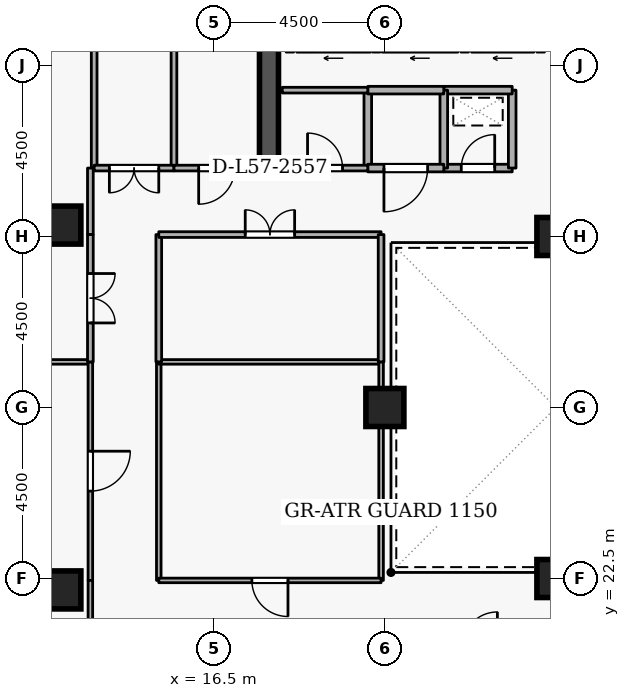
"""IFC4 building model, lengths in metres.
Left out: names, types, materials, properties, quantities, classifications, styles, units other than length and angle.
Written with IfcOpenShell. Run it as: python <this file> out.ifc"""

import sys

from ifc_helpers import new_model, si_unit, direction, frame, frame_2d, origin, origin_2d, place, context, subcontext, project, spatial, rectangle, extrude, element, fill, save


model = new_model("IFC4")
c1 = context("Model", 3, precision=1e-05, world=origin(), true_north=direction((0.0, 1.0)))
c2 = subcontext(c1, "Body", "Model", "MODEL_VIEW")
j1 = project(units=[si_unit("LENGTHUNIT", "METRE"), si_unit("PLANEANGLEUNIT", "RADIAN")], contexts=[c1])
p1 = place(None, origin())
s1 = spatial("IfcSite", under=j1, at=p1, CompositionType="ELEMENT")
p2 = place(p1, origin())
s2 = spatial("IfcBuilding", under=s1, at=p2, CompositionType="ELEMENT")
p3 = place(p2, frame((0.0, 0.0, 214.5)))
s3 = spatial("IfcBuildingStorey", under=s2, at=p3, CompositionType="ELEMENT", Elevation=214.5)
p4 = place(p3, frame((17.95, 33.1, 0.0), z_axis=(0.0, 0.0, 1.0), x_axis=(0.0, 1.0, 0.0)))
e1 = element("IfcWall", 1, at=p4, inside=s3, PredefinedType="SHEAR", context=c2, shape_type="SweptSolid", body=[
    extrude(rectangle(XDim=5.8, YDim=0.5, at=frame_2d((2.9, 0.0))), origin(), (0.0, 0.0, 1.0), 3.6),
])
for number, where, z_axis, x_axis in (
    (2, (12.5, 22.2, 0.0), (0.0, 0.0, 1.0), (1.0, 0.0, 0.0)),
    (3, (12.5, 31.8, 0.0), (0.0, 0.0, 1.0), (1.0, 0.0, 0.0)),
    (4, (25.5, 22.5, 0.0), (0.0, 0.0, 1.0), (1.0, 0.0, 0.0)),
    (5, (25.5, 31.5, 0.0), (0.0, 0.0, 1.0), (1.0, 0.0, 0.0)),
    (6, (21.0, 27.0, 0.0), (0.0, 0.0, 1.0), (1.0, 0.0, 0.0)),
):
    element("IfcColumn", number, at=place(p3, frame(where, z_axis=z_axis, x_axis=x_axis)), inside=s3, PredefinedType="COLUMN", context=c2, shape_type="SweptSolid", body=[
        extrude(rectangle(XDim=1.0, YDim=1.0, at=origin_2d()), origin(), (0.0, 0.0, 1.0), 3.6),
    ])
p5 = place(p3, frame((24.92, 36.45, 0.0), z_axis=(0.0, 0.0, 1.0), x_axis=(-1.0, 0.0, 0.0)))
e7 = element("IfcWall", 7, at=p5, inside=s3, PredefinedType="STANDARD", context=c2, shape_type="SweptSolid", body=[
    extrude(rectangle(XDim=1.64, YDim=0.2, at=frame_2d((0.82, 0.0))), origin(), (0.0, 0.0, 1.0), 3.34),
])
p6 = place(p5, frame((0.31, 0.0, 0.0)))
e8 = element("IfcOpeningElement", 8, at=p6, cuts=e7, PredefinedType="OPENING", context=c2, shape_type="SweptSolid", body=[
    extrude(rectangle(XDim=1.02, YDim=2.06, at=frame_2d((0.51, 1.03))), frame((0.0, 0.11, 0.0), z_axis=(0.0, -1.0, 0.0), x_axis=(1.0, 0.0, 0.0)), (0.0, 0.0, 1.0), 0.22),
])
p7 = place(p3, frame((22.92, 36.45, 0.0), z_axis=(0.0, 0.0, 1.0), x_axis=(-1.0, 0.0, 0.0)))
e9 = element("IfcWall", 9, at=p7, inside=s3, PredefinedType="STANDARD", context=c2, shape_type="SweptSolid", body=[
    extrude(rectangle(XDim=1.99, YDim=0.2, at=frame_2d((0.995, 0.0))), origin(), (0.0, 0.0, 1.0), 3.34),
])
p8 = place(p7, frame((0.485, 0.0, 0.0)))
e10 = element("IfcOpeningElement", 10, at=p8, cuts=e9, PredefinedType="OPENING", context=c2, shape_type="SweptSolid", body=[
    extrude(rectangle(XDim=1.02, YDim=2.06, at=frame_2d((0.51, 1.03))), frame((0.0, 0.11, 0.0), z_axis=(0.0, -1.0, 0.0), x_axis=(1.0, 0.0, 0.0)), (0.0, 0.0, 1.0), 0.22),
])
p9 = place(p3, frame((20.62, 36.45, 0.0), z_axis=(0.0, 0.0, 1.0), x_axis=(-1.0, 0.0, 0.0)))
e11 = element("IfcWall", 11, at=p9, inside=s3, PredefinedType="STANDARD", context=c2, shape_type="SweptSolid", body=[
    extrude(rectangle(XDim=1.94, YDim=0.2, at=frame_2d((0.97, 0.0))), origin(), (0.0, 0.0, 1.0), 3.34),
])
p10 = place(p9, frame((0.46, 0.0, 0.0)))
e12 = element("IfcOpeningElement", 12, at=p10, cuts=e11, PredefinedType="OPENING", context=c2, shape_type="SweptSolid", body=[
    extrude(rectangle(XDim=1.02, YDim=2.06, at=frame_2d((0.51, 1.03))), frame((0.0, 0.11, 0.0), z_axis=(0.0, -1.0, 0.0), x_axis=(1.0, 0.0, 0.0)), (0.0, 0.0, 1.0), 0.22),
])
p11 = place(p3, frame((22.55, 33.3, 0.0), z_axis=(0.0, 0.0, 1.0), x_axis=(1.0, 0.0, 0.0)))
e13 = element("IfcWall", 13, at=p11, inside=s3, PredefinedType="STANDARD", context=c2, shape_type="SweptSolid", body=[
    extrude(rectangle(XDim=1.8, YDim=0.2, at=frame_2d((0.9, 0.0))), origin(), (0.0, 0.0, 1.0), 3.34),
])
p12 = place(p11, frame((0.46, 0.0, 0.0)))
e14 = element("IfcOpeningElement", 14, at=p12, cuts=e13, PredefinedType="OPENING", context=c2, shape_type="SweptSolid", body=[
    extrude(rectangle(XDim=0.88, YDim=2.04, at=frame_2d((0.44, 1.02))), frame((0.0, 0.11, 0.0), z_axis=(0.0, -1.0, 0.0), x_axis=(1.0, 0.0, 0.0)), (0.0, 0.0, 1.0), 0.22),
])
p13 = place(p3, frame((24.35, 33.3, 0.0), z_axis=(0.0, 0.0, 1.0), x_axis=(0.0, 1.0, 0.0)))
e15 = element("IfcWall", 15, at=p13, inside=s3, PredefinedType="STANDARD", context=c2, shape_type="SweptSolid", body=[
    extrude(rectangle(XDim=2.05, YDim=0.2, at=frame_2d((1.025, 0.0))), origin(), (0.0, 0.0, 1.0), 3.34),
])
p14 = place(p3, frame((24.35, 35.35, 0.0), z_axis=(0.0, 0.0, 1.0), x_axis=(-1.0, 0.0, 0.0)))
e16 = element("IfcWall", 16, at=p14, inside=s3, PredefinedType="STANDARD", context=c2, shape_type="SweptSolid", body=[
    extrude(rectangle(XDim=1.8, YDim=0.2, at=frame_2d((0.9, 0.0))), origin(), (0.0, 0.0, 1.0), 3.34),
])
for number, where, z_axis, x_axis in (
    (17, (22.55, 35.35, 0.0), (0.0, 0.0, 1.0), (0.0, -1.0, 0.0)),
    (18, (20.55, 33.3, 0.0), (0.0, 0.0, 1.0), (0.0, 1.0, 0.0)),
):
    element("IfcWall", number, at=place(p3, frame(where, z_axis=z_axis, x_axis=x_axis)), inside=s3, PredefinedType="STANDARD", context=c2, shape_type="SweptSolid", body=[
        extrude(rectangle(XDim=2.05, YDim=0.2, at=frame_2d((1.025, 0.0))), origin(), (0.0, 0.0, 1.0), 3.34),
    ])
p15 = place(p3, frame((20.55, 35.35, 0.0), z_axis=(0.0, 0.0, 1.0), x_axis=(1.0, 0.0, 0.0)))
e19 = element("IfcWall", 19, at=p15, inside=s3, PredefinedType="STANDARD", context=c2, shape_type="SweptSolid", body=[
    extrude(rectangle(XDim=2.0, YDim=0.2, at=frame_2d((1.0, 0.0))), origin(), (0.0, 0.0, 1.0), 3.34),
])
p16 = place(p3, frame((22.55, 33.3, 0.0), z_axis=(0.0, 0.0, 1.0), x_axis=(-1.0, 0.0, 0.0)))
e20 = element("IfcWall", 20, at=p16, inside=s3, PredefinedType="STANDARD", context=c2, shape_type="SweptSolid", body=[
    extrude(rectangle(XDim=2.0, YDim=0.2, at=frame_2d((1.0, 0.0))), origin(), (0.0, 0.0, 1.0), 3.34),
])
p17 = place(p16, frame((0.425, 0.0, 0.0)))
e21 = element("IfcOpeningElement", 21, at=p17, cuts=e20, PredefinedType="OPENING", context=c2, shape_type="SweptSolid", body=[
    extrude(rectangle(XDim=1.15, YDim=2.1, at=frame_2d((0.575, 1.05))), frame((0.0, 0.11, 0.0), z_axis=(0.0, -1.0, 0.0), x_axis=(1.0, 0.0, 0.0)), (0.0, 0.0, 1.0), 0.22),
])
p18 = place(p3, frame((18.3, 33.3, 0.0), z_axis=(0.0, 0.0, 1.0), x_axis=(1.0, 0.0, 0.0)))
e22 = element("IfcWall", 22, at=p18, inside=s3, PredefinedType="PARTITIONING", context=c2, shape_type="SweptSolid", body=[
    extrude(rectangle(XDim=2.25, YDim=0.15, at=frame_2d((1.125, 0.0))), origin(), (0.0, 0.0, 1.0), 3.34),
])
p19 = place(p18, frame((0.665, 0.0, 0.0)))
e23 = element("IfcOpeningElement", 23, at=p19, cuts=e22, PredefinedType="OPENING", context=c2, shape_type="SweptSolid", body=[
    extrude(rectangle(XDim=0.92, YDim=2.08, at=frame_2d((0.46, 1.04))), frame((0.0, 0.085, 0.0), z_axis=(0.0, -1.0, 0.0), x_axis=(1.0, 0.0, 0.0)), (0.0, 0.0, 1.0), 0.17),
])
p20 = place(p3, frame((20.55, 35.35, 0.0), z_axis=(0.0, 0.0, 1.0), x_axis=(-1.0, 0.0, 0.0)))
e24 = element("IfcWall", 24, at=p20, inside=s3, PredefinedType="PARTITIONING", context=c2, shape_type="SweptSolid", body=[
    extrude(rectangle(XDim=2.25, YDim=0.15, at=frame_2d((1.125, 0.0))), origin(), (0.0, 0.0, 1.0), 3.34),
])
for number, where, z_axis, x_axis in (
    (25, (13.35, 33.3, 0.0), (0.0, 0.0, 1.0), (0.0, 1.0, 0.0)),
    (26, (15.45, 50.72, 0.0), (0.0, 0.0, 1.0), (0.0, -1.0, 0.0)),
):
    element("IfcWall", number, at=place(p3, frame(where, z_axis=z_axis, x_axis=x_axis)), inside=s3, PredefinedType="PARTITIONING", context=c2, shape_type="SweptSolid", body=[
        extrude(rectangle(XDim=17.42, YDim=0.15, at=frame_2d((8.71, 0.0))), origin(), (0.0, 0.0, 1.0), 3.34),
    ])
p21 = place(p3, frame((15.45, 33.3, 0.0), z_axis=(0.0, 0.0, 1.0), x_axis=(-1.0, 0.0, 0.0)))
e27 = element("IfcWall", 27, at=p21, inside=s3, PredefinedType="PARTITIONING", context=c2, shape_type="SweptSolid", body=[
    extrude(rectangle(XDim=2.1, YDim=0.15, at=frame_2d((1.05, 0.0))), origin(), (0.0, 0.0, 1.0), 3.34),
])
p22 = place(p21, frame((0.4, 0.0, 0.0)))
e28 = element("IfcOpeningElement", 28, at=p22, cuts=e27, PredefinedType="OPENING", context=c2, shape_type="SweptSolid", body=[
    extrude(rectangle(XDim=1.3, YDim=2.12, at=frame_2d((0.65, 1.06))), frame((0.0, 0.085, 0.0), z_axis=(0.0, -1.0, 0.0), x_axis=(1.0, 0.0, 0.0)), (0.0, 0.0, 1.0), 0.17),
])
p23 = place(p3, frame((17.7, 33.3, 0.0), z_axis=(0.0, 0.0, 1.0), x_axis=(-1.0, 0.0, 0.0)))
e29 = element("IfcWall", 29, at=p23, inside=s3, PredefinedType="PARTITIONING", context=c2, shape_type="SweptSolid", body=[
    extrude(rectangle(XDim=2.25, YDim=0.15, at=frame_2d((1.125, 0.0))), origin(), (0.0, 0.0, 1.0), 3.34),
])
p24 = place(p23, frame((0.65, 0.0, 0.0)))
e30 = element("IfcOpeningElement", 30, at=p24, cuts=e29, PredefinedType="OPENING", context=c2, shape_type="SweptSolid", body=[
    extrude(rectangle(XDim=0.95, YDim=2.1, at=frame_2d((0.475, 1.05))), frame((0.0, 0.085, 0.0), z_axis=(0.0, -1.0, 0.0), x_axis=(1.0, 0.0, 0.0)), (0.0, 0.0, 1.0), 0.17),
])
p25 = place(p3, frame((1.78, 28.2, 0.0), z_axis=(0.0, 0.0, 1.0), x_axis=(1.0, 0.0, 0.0)))
e31 = element("IfcWall", 31, at=p25, inside=s3, PredefinedType="PARTITIONING", context=c2, shape_type="SweptSolid", body=[
    extrude(rectangle(XDim=11.47, YDim=0.12, at=frame_2d((5.735, 0.0))), origin(), (0.0, 0.0, 1.0), 3.34),
])
p26 = place(p3, frame((13.25, 28.2, 0.0), z_axis=(0.0, 0.0, 1.0), x_axis=(0.0, -1.0, 0.0)))
e32 = element("IfcWall", 32, at=p26, inside=s3, PredefinedType="PARTITIONING", context=c2, shape_type="SweptSolid", body=[
    extrude(rectangle(XDim=5.75, YDim=0.12, at=frame_2d((2.875, 0.0))), origin(), (0.0, 0.0, 1.0), 3.34),
])
p27 = place(p26, frame((2.35, 0.0, 0.0)))
e33 = element("IfcOpeningElement", 33, at=p27, cuts=e32, PredefinedType="OPENING", context=c2, shape_type="SweptSolid", body=[
    extrude(rectangle(XDim=1.05, YDim=2.1, at=frame_2d((0.525, 1.05))), frame((0.0, 0.07, 0.0), z_axis=(0.0, -1.0, 0.0), x_axis=(1.0, 0.0, 0.0)), (0.0, 0.0, 1.0), 0.14),
])
p28 = place(p3, frame((13.25, 22.45, 0.0), z_axis=(0.0, 0.0, 1.0), x_axis=(0.0, -1.0, 0.0)))
e34 = element("IfcWall", 34, at=p28, inside=s3, PredefinedType="PARTITIONING", context=c2, shape_type="SweptSolid", body=[
    extrude(rectangle(XDim=1.75, YDim=0.12, at=frame_2d((0.875, 0.0))), origin(), (0.0, 0.0, 1.0), 3.34),
])
p29 = place(p3, frame((13.25, 33.3, 0.0), z_axis=(0.0, 0.0, 1.0), x_axis=(0.0, -1.0, 0.0)))
e35 = element("IfcWall", 35, at=p29, inside=s3, PredefinedType="PARTITIONING", context=c2, shape_type="SweptSolid", body=[
    extrude(rectangle(XDim=1.75, YDim=0.15, at=frame_2d((0.875, 0.0))), origin(), (0.0, 0.0, 1.0), 3.34),
])
p30 = place(p3, frame((13.25, 31.55, 0.0), z_axis=(0.0, 0.0, 1.0), x_axis=(0.0, -1.0, 0.0)))
e36 = element("IfcWall", 36, at=p30, inside=s3, PredefinedType="PARTITIONING", context=c2, shape_type="SweptSolid", body=[
    extrude(rectangle(XDim=3.35, YDim=0.15, at=frame_2d((1.675, 0.0))), origin(), (0.0, 0.0, 1.0), 3.34),
])
p31 = place(p30, frame((1.025, 0.0, 0.0)))
e37 = element("IfcOpeningElement", 37, at=p31, cuts=e36, PredefinedType="OPENING", context=c2, shape_type="SweptSolid", body=[
    extrude(rectangle(XDim=1.3, YDim=2.12, at=frame_2d((0.65, 1.06))), frame((0.0, 0.085, 0.0), z_axis=(0.0, -1.0, 0.0), x_axis=(1.0, 0.0, 0.0)), (0.0, 0.0, 1.0), 0.17),
])
p32 = place(p3, frame((15.05, 22.45, 0.0), z_axis=(0.0, 0.0, 1.0), x_axis=(0.0, 1.0, 0.0)))
e38 = element("IfcWall", 38, at=p32, inside=s3, PredefinedType="PARTITIONING", context=c2, shape_type="SweptSolid", body=[
    extrude(rectangle(XDim=5.75, YDim=0.12, at=frame_2d((2.875, 0.0))), origin(), (0.0, 0.0, 1.0), 3.34),
])
p33 = place(p3, frame((15.05, 28.2, 0.0), z_axis=(0.0, 0.0, 1.0), x_axis=(1.0, 0.0, 0.0)))
e39 = element("IfcWall", 39, at=p33, inside=s3, PredefinedType="PARTITIONING", context=c2, shape_type="SweptSolid", body=[
    extrude(rectangle(XDim=5.85, YDim=0.12, at=frame_2d((2.925, 0.0))), origin(), (0.0, 0.0, 1.0), 3.34),
])
p34 = place(p3, frame((20.9, 28.2, 0.0), z_axis=(0.0, 0.0, 1.0), x_axis=(0.0, -1.0, 0.0)))
e40 = element("IfcWall", 40, at=p34, inside=s3, PredefinedType="PARTITIONING", context=c2, shape_type="SweptSolid", body=[
    extrude(rectangle(XDim=5.75, YDim=0.12, at=frame_2d((2.875, 0.0))), origin(), (0.0, 0.0, 1.0), 3.34),
])
p35 = place(p3, frame((20.9, 22.45, 0.0), z_axis=(0.0, 0.0, 1.0), x_axis=(-1.0, 0.0, 0.0)))
e41 = element("IfcWall", 41, at=p35, inside=s3, PredefinedType="PARTITIONING", context=c2, shape_type="SweptSolid", body=[
    extrude(rectangle(XDim=5.85, YDim=0.12, at=frame_2d((2.925, 0.0))), origin(), (0.0, 0.0, 1.0), 3.34),
])
p36 = place(p35, frame((2.45, 0.0, 0.0)))
e42 = element("IfcOpeningElement", 42, at=p36, cuts=e41, PredefinedType="OPENING", context=c2, shape_type="SweptSolid", body=[
    extrude(rectangle(XDim=0.95, YDim=2.1, at=frame_2d((0.475, 1.05))), frame((0.0, 0.07, 0.0), z_axis=(0.0, -1.0, 0.0), x_axis=(1.0, 0.0, 0.0)), (0.0, 0.0, 1.0), 0.14),
])
p37 = place(p3, frame((15.05, 28.2, 0.0), z_axis=(0.0, 0.0, 1.0), x_axis=(0.0, 1.0, 0.0)))
e43 = element("IfcWall", 43, at=p37, inside=s3, PredefinedType="PARTITIONING", context=c2, shape_type="SweptSolid", body=[
    extrude(rectangle(XDim=3.35, YDim=0.15, at=frame_2d((1.675, 0.0))), origin(), (0.0, 0.0, 1.0), 3.34),
])
p38 = place(p3, frame((15.05, 31.55, 0.0), z_axis=(0.0, 0.0, 1.0), x_axis=(1.0, 0.0, 0.0)))
e44 = element("IfcWall", 44, at=p38, inside=s3, PredefinedType="PARTITIONING", context=c2, shape_type="SweptSolid", body=[
    extrude(rectangle(XDim=5.85, YDim=0.15, at=frame_2d((2.925, 0.0))), origin(), (0.0, 0.0, 1.0), 3.34),
])
p39 = place(p38, frame((2.275, 0.0, 0.0)))
e45 = element("IfcOpeningElement", 45, at=p39, cuts=e44, PredefinedType="OPENING", context=c2, shape_type="SweptSolid", body=[
    extrude(rectangle(XDim=1.3, YDim=2.12, at=frame_2d((0.65, 1.06))), frame((0.0, 0.085, 0.0), z_axis=(0.0, -1.0, 0.0), x_axis=(1.0, 0.0, 0.0)), (0.0, 0.0, 1.0), 0.17),
])
p40 = place(p3, frame((20.9, 31.55, 0.0), z_axis=(0.0, 0.0, 1.0), x_axis=(0.0, -1.0, 0.0)))
e46 = element("IfcWall", 46, at=p40, inside=s3, PredefinedType="PARTITIONING", context=c2, shape_type="SweptSolid", body=[
    extrude(rectangle(XDim=3.35, YDim=0.15, at=frame_2d((1.675, 0.0))), origin(), (0.0, 0.0, 1.0), 3.34),
])
p41 = place(p12, origin())
e47 = element("IfcDoor", 47, at=p41, inside=s3, OperationType="SINGLE_SWING_RIGHT", PredefinedType="DOOR", context=c2, shape_type="SweptSolid", body=[
    extrude(rectangle(XDim=0.88, YDim=2.04, at=frame_2d((0.44, 1.02))), frame((0.0, 0.025, 0.0), z_axis=(0.0, -1.0, 0.0), x_axis=(1.0, 0.0, 0.0)), (0.0, 0.0, 1.0), 0.05),
])
fill(e14, e47)
p42 = place(p19, origin())
e48 = element("IfcDoor", 48, at=p42, inside=s3, OperationType="SINGLE_SWING_LEFT", PredefinedType="DOOR", context=c2, shape_type="SweptSolid", body=[
    extrude(rectangle(XDim=0.92, YDim=2.08, at=frame_2d((0.46, 1.04))), frame((0.0, 0.025, 0.0), z_axis=(0.0, -1.0, 0.0), x_axis=(1.0, 0.0, 0.0)), (0.0, 0.0, 1.0), 0.05),
])
fill(e23, e48)
p43 = place(p17, origin())
e49 = element("IfcDoor", 49, at=p43, inside=s3, OperationType="SINGLE_SWING_RIGHT", PredefinedType="DOOR", context=c2, shape_type="SweptSolid", body=[
    extrude(rectangle(XDim=1.15, YDim=2.1, at=frame_2d((0.575, 1.05))), frame((0.0, 0.025, 0.0), z_axis=(0.0, -1.0, 0.0), x_axis=(1.0, 0.0, 0.0)), (0.0, 0.0, 1.0), 0.05),
])
fill(e21, e49)
p44 = place(p22, origin())
e50 = element("IfcDoor", 50, at=p44, inside=s3, OperationType="DOUBLE_DOOR_SINGLE_SWING", PredefinedType="DOOR", context=c2, shape_type="SweptSolid", body=[
    extrude(rectangle(XDim=1.3, YDim=2.12, at=frame_2d((0.65, 1.06))), frame((0.0, 0.025, 0.0), z_axis=(0.0, -1.0, 0.0), x_axis=(1.0, 0.0, 0.0)), (0.0, 0.0, 1.0), 0.05),
])
fill(e28, e50)
p45 = place(p24, origin())
e51 = element("IfcDoor", 51, at=p45, inside=s3, OperationType="SINGLE_SWING_RIGHT", PredefinedType="DOOR", context=c2, shape_type="SweptSolid", body=[
    extrude(rectangle(XDim=0.95, YDim=2.1, at=frame_2d((0.475, 1.05))), frame((0.0, 0.025, 0.0), z_axis=(0.0, -1.0, 0.0), x_axis=(1.0, 0.0, 0.0)), (0.0, 0.0, 1.0), 0.05),
])
fill(e30, e51)
p46 = place(p27, origin())
e52 = element("IfcDoor", 52, at=p46, inside=s3, OperationType="SINGLE_SWING_LEFT", PredefinedType="DOOR", context=c2, shape_type="SweptSolid", body=[
    extrude(rectangle(XDim=1.05, YDim=2.1, at=frame_2d((0.525, 1.05))), frame((0.0, 0.025, 0.0), z_axis=(0.0, -1.0, 0.0), x_axis=(1.0, 0.0, 0.0)), (0.0, 0.0, 1.0), 0.05),
])
fill(e33, e52)
p47 = place(p31, origin())
e53 = element("IfcDoor", 53, at=p47, inside=s3, OperationType="DOUBLE_DOOR_SINGLE_SWING", PredefinedType="DOOR", context=c2, shape_type="SweptSolid", body=[
    extrude(rectangle(XDim=1.3, YDim=2.12, at=frame_2d((0.65, 1.06))), frame((0.0, 0.025, 0.0), z_axis=(0.0, -1.0, 0.0), x_axis=(1.0, 0.0, 0.0)), (0.0, 0.0, 1.0), 0.05),
])
fill(e37, e53)
p48 = place(p36, origin())
e54 = element("IfcDoor", 54, at=p48, inside=s3, OperationType="SINGLE_SWING_LEFT", PredefinedType="DOOR", context=c2, shape_type="SweptSolid", body=[
    extrude(rectangle(XDim=0.95, YDim=2.1, at=frame_2d((0.475, 1.05))), frame((0.0, 0.025, 0.0), z_axis=(0.0, -1.0, 0.0), x_axis=(1.0, 0.0, 0.0)), (0.0, 0.0, 1.0), 0.05),
])
fill(e42, e54)
p49 = place(p39, origin())
e55 = element("IfcDoor", 55, at=p49, inside=s3, OperationType="DOUBLE_DOOR_SINGLE_SWING", PredefinedType="DOOR", context=c2, shape_type="SweptSolid", body=[
    extrude(rectangle(XDim=1.3, YDim=2.12, at=frame_2d((0.65, 1.06))), frame((0.0, 0.025, 0.0), z_axis=(0.0, -1.0, 0.0), x_axis=(1.0, 0.0, 0.0)), (0.0, 0.0, 1.0), 0.05),
])
fill(e45, e55)
save(model, sys.argv[1])
